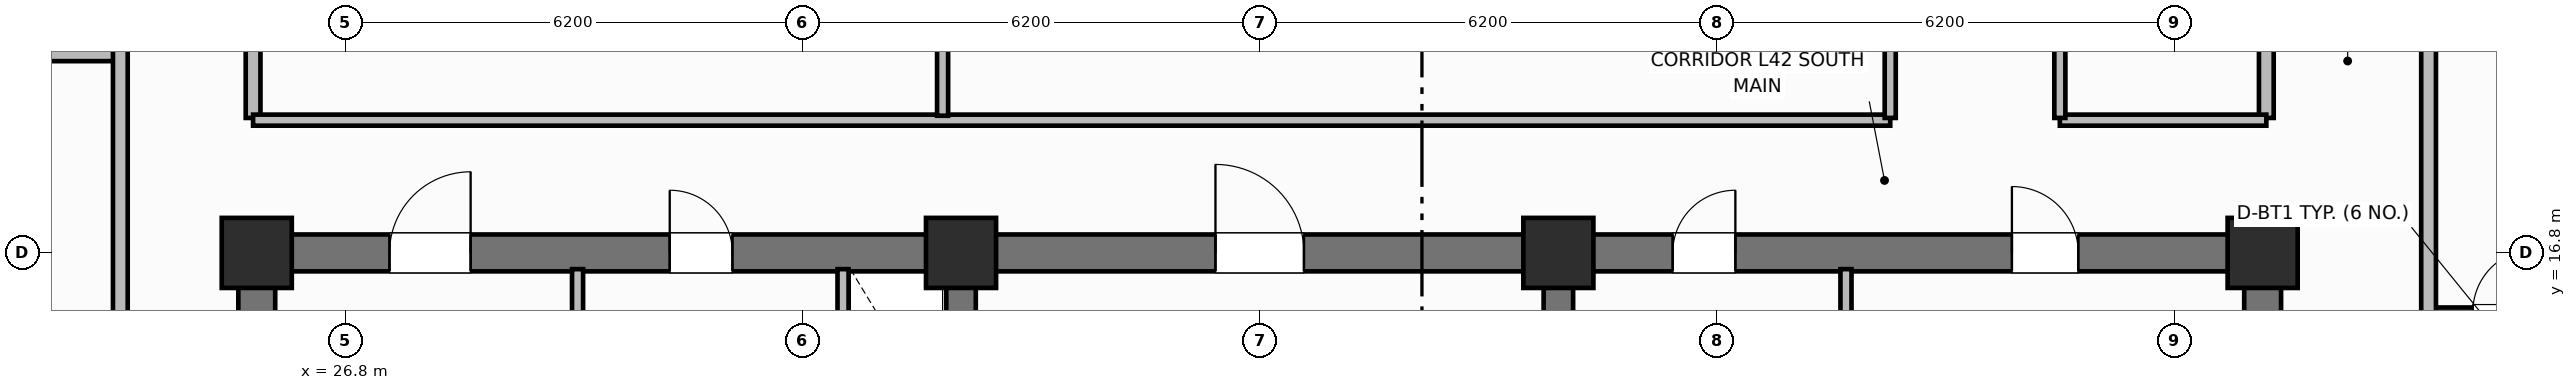
"""IFC4 building model, lengths in metres.
Left out: names, types, materials, properties, quantities, classifications, styles, units other than length and angle.
Written with IfcOpenShell. Run it as: python <this file> out.ifc"""

import sys

from ifc_helpers import new_model, si_unit, direction, frame, frame_2d, origin, origin_2d, place, context, subcontext, project, spatial, rectangle, extrude, element, fill, save


model = new_model("IFC4")
c1 = context("Model", 3, precision=1e-05, world=origin(), true_north=direction((0.0, 1.0)))
c2 = subcontext(c1, "Body", "Model", "MODEL_VIEW")
j1 = project(units=[si_unit("LENGTHUNIT", "METRE"), si_unit("PLANEANGLEUNIT", "RADIAN")], contexts=[c1])
p1 = place(None, origin())
s1 = spatial("IfcSite", under=j1, at=p1, CompositionType="ELEMENT")
p2 = place(p1, origin())
s2 = spatial("IfcBuilding", under=s1, at=p2, CompositionType="ELEMENT")
p3 = place(p2, frame((0.0, 0.0, 170.0)))
s3 = spatial("IfcBuildingStorey", under=s2, at=p3, CompositionType="ELEMENT", Elevation=170.0)
for number, where, z_axis, x_axis in (
    (1, (25.6, 10.85, 0.0), (0.0, 0.0, 1.0), (0.0, 1.0, 0.0)),
    (2, (52.8, 10.85, 0.0), (0.0, 0.0, 1.0), (0.0, 1.0, 0.0)),
):
    element("IfcWall", number, at=place(p3, frame(where, z_axis=z_axis, x_axis=x_axis)), inside=s3, PredefinedType="SHEAR", context=c2, shape_type="SweptSolid", body=[
        extrude(rectangle(XDim=5.7, YDim=0.5, at=frame_2d((2.85, 0.0))), origin(), (0.0, 0.0, 1.0), 3.7),
    ])
p4 = place(p3, frame((25.6, 16.8, 0.0), z_axis=(0.0, 0.0, 1.0), x_axis=(1.0, 0.0, 0.0)))
e3 = element("IfcWall", 3, at=p4, inside=s3, PredefinedType="SHEAR", context=c2, shape_type="SweptSolid", body=[
    extrude(rectangle(XDim=27.2, YDim=0.5, at=frame_2d((13.6, 0.0))), origin(), (0.0, 0.0, 1.0), 3.7),
])
p5 = place(p4, frame((1.8, 0.0, 0.0)))
e4 = element("IfcOpeningElement", 4, at=p5, cuts=e3, PredefinedType="OPENING", context=c2, shape_type="SweptSolid", body=[
    extrude(rectangle(XDim=1.1, YDim=2.15, at=frame_2d((0.55, 1.075))), frame((0.0, 0.26, 0.0), z_axis=(0.0, -1.0, 0.0), x_axis=(1.0, 0.0, 0.0)), (0.0, 0.0, 1.0), 0.52),
])
p6 = place(p4, frame((5.6, 0.0, 0.0)))
e5 = element("IfcOpeningElement", 5, at=p6, cuts=e3, PredefinedType="OPENING", context=c2, shape_type="SweptSolid", body=[
    extrude(rectangle(XDim=0.85, YDim=2.1, at=frame_2d((0.425, 1.05))), frame((0.0, 0.26, 0.0), z_axis=(0.0, -1.0, 0.0), x_axis=(1.0, 0.0, 0.0)), (0.0, 0.0, 1.0), 0.52),
])
p7 = place(p4, frame((13.0, 0.0, 0.0)))
e6 = element("IfcOpeningElement", 6, at=p7, cuts=e3, PredefinedType="OPENING", context=c2, shape_type="SweptSolid", body=[
    extrude(rectangle(XDim=1.2, YDim=2.15, at=frame_2d((0.6, 1.075))), frame((0.0, 0.26, 0.0), z_axis=(0.0, -1.0, 0.0), x_axis=(1.0, 0.0, 0.0)), (0.0, 0.0, 1.0), 0.52),
])
p8 = place(p4, frame((19.2, 0.0, 0.0)))
e7 = element("IfcOpeningElement", 7, at=p8, cuts=e3, PredefinedType="OPENING", context=c2, shape_type="SweptSolid", body=[
    extrude(rectangle(XDim=0.85, YDim=2.1, at=frame_2d((0.425, 1.05))), frame((0.0, 0.26, 0.0), z_axis=(0.0, -1.0, 0.0), x_axis=(1.0, 0.0, 0.0)), (0.0, 0.0, 1.0), 0.52),
])
p9 = place(p4, frame((23.8, 0.0, 0.0)))
e8 = element("IfcOpeningElement", 8, at=p9, cuts=e3, PredefinedType="OPENING", context=c2, shape_type="SweptSolid", body=[
    extrude(rectangle(XDim=0.9, YDim=2.1, at=frame_2d((0.45, 1.05))), frame((0.0, 0.26, 0.0), z_axis=(0.0, -1.0, 0.0), x_axis=(1.0, 0.0, 0.0)), (0.0, 0.0, 1.0), 0.52),
])
for number, where, z_axis, x_axis in (
    (9, (35.15, 10.85, 0.0), (0.0, 0.0, 1.0), (0.0, 1.0, 0.0)),
    (10, (43.25, 10.85, 0.0), (0.0, 0.0, 1.0), (0.0, 1.0, 0.0)),
):
    element("IfcWall", number, at=place(p3, frame(where, z_axis=z_axis, x_axis=x_axis)), inside=s3, PredefinedType="SHEAR", context=c2, shape_type="SweptSolid", body=[
        extrude(rectangle(XDim=5.7, YDim=0.4, at=frame_2d((2.85, 0.0))), origin(), (0.0, 0.0, 1.0), 3.7),
    ])
for number, where, z_axis, x_axis in (
    (11, (25.6, 16.8, 0.0), (0.0, 0.0, 1.0), (1.0, 0.0, 0.0)),
    (12, (35.15, 16.8, 0.0), (0.0, 0.0, 1.0), (1.0, 0.0, 0.0)),
    (13, (43.25, 16.8, 0.0), (0.0, 0.0, 1.0), (1.0, 0.0, 0.0)),
    (14, (52.8, 16.8, 0.0), (0.0, 0.0, 1.0), (1.0, 0.0, 0.0)),
):
    element("IfcColumn", number, at=place(p3, frame(where, z_axis=z_axis, x_axis=x_axis)), inside=s3, PredefinedType="COLUMN", context=c2, shape_type="SweptSolid", body=[
        extrude(rectangle(XDim=0.95, YDim=0.95, at=origin_2d()), origin(), (0.0, 0.0, 1.0), 3.7),
    ])
p10 = place(p3, frame((29.95, 14.5, 0.0), z_axis=(0.0, 0.0, 1.0), x_axis=(0.0, 1.0, 0.0)))
e15 = element("IfcWall", 15, at=p10, inside=s3, PredefinedType="PARTITIONING", context=c2, shape_type="SweptSolid", body=[
    extrude(rectangle(XDim=2.08, YDim=0.15, at=frame_2d((1.04, 0.0))), origin(), (0.0, 0.0, 1.0), 2.55),
])
p11 = place(p3, frame((33.55, 14.5, 0.0), z_axis=(0.0, 0.0, 1.0), x_axis=(0.0, 1.0, 0.0)))
e16 = element("IfcWall", 16, at=p11, inside=s3, PredefinedType="PARTITIONING", context=c2, shape_type="SweptSolid", body=[
    extrude(rectangle(XDim=2.08, YDim=0.15, at=frame_2d((1.04, 0.0))), origin(), (0.0, 0.0, 1.0), 2.55),
])
p12 = place(p11, frame((0.55, 0.0, 0.0)))
e17 = element("IfcOpeningElement", 17, at=p12, cuts=e16, PredefinedType="OPENING", context=c2, shape_type="SweptSolid", body=[
    extrude(rectangle(XDim=0.85, YDim=2.05, at=frame_2d((0.425, 1.025))), frame((0.0, 0.085, 0.0), z_axis=(0.0, -1.0, 0.0), x_axis=(1.0, 0.0, 0.0)), (0.0, 0.0, 1.0), 0.17),
])
p13 = place(p3, frame((47.15, 10.95, 0.0), z_axis=(0.0, 0.0, 1.0), x_axis=(0.0, 1.0, 0.0)))
e18 = element("IfcWall", 18, at=p13, inside=s3, PredefinedType="PARTITIONING", context=c2, shape_type="SweptSolid", body=[
    extrude(rectangle(XDim=5.63, YDim=0.15, at=frame_2d((2.815, 0.0))), origin(), (0.0, 0.0, 1.0), 2.55),
])
for number, where, z_axis, x_axis in (
    (19, (25.55, 18.63, 0.0), (0.0, 0.0, 1.0), (0.0, 1.0, 0.0)),
    (20, (52.85, 18.63, 0.0), (0.0, 0.0, 1.0), (0.0, 1.0, 0.0)),
):
    element("IfcWall", number, at=place(p3, frame(where, z_axis=z_axis, x_axis=x_axis)), inside=s3, PredefinedType="PARTITIONING", context=c2, shape_type="SweptSolid", body=[
        extrude(rectangle(XDim=19.14, YDim=0.2, at=frame_2d((9.57, 0.0))), origin(), (0.0, 0.0, 1.0), 2.55),
    ])
p14 = place(p3, frame((25.55, 18.6, 0.0), z_axis=(0.0, 0.0, 1.0), x_axis=(1.0, 0.0, 0.0)))
e21 = element("IfcWall", 21, at=p14, inside=s3, PredefinedType="PARTITIONING", context=c2, shape_type="SweptSolid", body=[
    extrude(rectangle(XDim=22.2, YDim=0.15, at=frame_2d((11.1, 0.0))), origin(), (0.0, 0.0, 1.0), 2.55),
])
p15 = place(p3, frame((50.05, 18.6, 0.0), z_axis=(0.0, 0.0, 1.0), x_axis=(1.0, 0.0, 0.0)))
e22 = element("IfcWall", 22, at=p15, inside=s3, PredefinedType="PARTITIONING", context=c2, shape_type="SweptSolid", body=[
    extrude(rectangle(XDim=2.8, YDim=0.15, at=frame_2d((1.4, 0.0))), origin(), (0.0, 0.0, 1.0), 2.55),
])
p16 = place(p3, frame((34.9, 18.66, 0.0), z_axis=(0.0, 0.0, 1.0), x_axis=(0.0, 1.0, 0.0)))
e23 = element("IfcWall", 23, at=p16, inside=s3, PredefinedType="PARTITIONING", context=c2, shape_type="SweptSolid", body=[
    extrude(rectangle(XDim=19.08, YDim=0.15, at=frame_2d((9.54, 0.0))), origin(), (0.0, 0.0, 1.0), 2.55),
])
p17 = place(p16, frame((5.0, 0.0, 0.0)))
e24 = element("IfcOpeningElement", 24, at=p17, cuts=e23, PredefinedType="OPENING", context=c2, shape_type="SweptSolid", body=[
    extrude(rectangle(XDim=1.0, YDim=2.15, at=frame_2d((0.5, 1.075))), frame((0.0, 0.085, 0.0), z_axis=(0.0, -1.0, 0.0), x_axis=(1.0, 0.0, 0.0)), (0.0, 0.0, 1.0), 0.17),
])
p18 = place(p3, frame((47.75, 18.63, 0.0), z_axis=(0.0, 0.0, 1.0), x_axis=(0.0, 1.0, 0.0)))
e25 = element("IfcWall", 25, at=p18, inside=s3, PredefinedType="PARTITIONING", context=c2, shape_type="SweptSolid", body=[
    extrude(rectangle(XDim=19.14, YDim=0.15, at=frame_2d((9.57, 0.0))), origin(), (0.0, 0.0, 1.0), 2.55),
])
p19 = place(p18, frame((2.4, 0.0, 0.0)))
e26 = element("IfcOpeningElement", 26, at=p19, cuts=e25, PredefinedType="OPENING", context=c2, shape_type="SweptSolid", body=[
    extrude(rectangle(XDim=0.9, YDim=2.1, at=frame_2d((0.45, 1.05))), frame((0.0, 0.085, 0.0), z_axis=(0.0, -1.0, 0.0), x_axis=(1.0, 0.0, 0.0)), (0.0, 0.0, 1.0), 0.17),
])
p20 = place(p18, frame((10.804, 0.0, 0.0)))
e27 = element("IfcOpeningElement", 27, at=p20, cuts=e25, PredefinedType="OPENING", context=c2, shape_type="SweptSolid", body=[
    extrude(rectangle(XDim=0.9, YDim=2.1, at=frame_2d((0.45, 1.05))), frame((0.0, 0.085, 0.0), z_axis=(0.0, -1.0, 0.0), x_axis=(1.0, 0.0, 0.0)), (0.0, 0.0, 1.0), 0.17),
])
p21 = place(p3, frame((50.05, 18.63, 0.0), z_axis=(0.0, 0.0, 1.0), x_axis=(0.0, 1.0, 0.0)))
e28 = element("IfcWall", 28, at=p21, inside=s3, PredefinedType="PARTITIONING", context=c2, shape_type="SweptSolid", body=[
    extrude(rectangle(XDim=19.14, YDim=0.15, at=frame_2d((9.57, 0.0))), origin(), (0.0, 0.0, 1.0), 2.55),
])
p22 = place(p21, frame((2.4, 0.0, 0.0)))
e29 = element("IfcOpeningElement", 29, at=p22, cuts=e28, PredefinedType="OPENING", context=c2, shape_type="SweptSolid", body=[
    extrude(rectangle(XDim=1.0, YDim=2.15, at=frame_2d((0.5, 1.075))), frame((0.0, 0.085, 0.0), z_axis=(0.0, -1.0, 0.0), x_axis=(1.0, 0.0, 0.0)), (0.0, 0.0, 1.0), 0.17),
])
p23 = place(p21, frame((10.804, 0.0, 0.0)))
e30 = element("IfcOpeningElement", 30, at=p23, cuts=e28, PredefinedType="OPENING", context=c2, shape_type="SweptSolid", body=[
    extrude(rectangle(XDim=1.0, YDim=2.15, at=frame_2d((0.5, 1.075))), frame((0.0, 0.085, 0.0), z_axis=(0.0, -1.0, 0.0), x_axis=(1.0, 0.0, 0.0)), (0.0, 0.0, 1.0), 0.17),
])
p24 = place(p3, frame((16.57, 19.5, 0.0), z_axis=(0.0, 0.0, 1.0), x_axis=(1.0, 0.0, 0.0)))
e31 = element("IfcWall", 31, at=p24, inside=s3, PredefinedType="PARTITIONING", context=c2, shape_type="SweptSolid", body=[
    extrude(rectangle(XDim=7.18, YDim=0.2, at=frame_2d((3.59, 0.0))), origin(), (0.0, 0.0, 1.0), 2.55),
])
p25 = place(p3, frame((23.75, 10.6, 0.0), z_axis=(0.0, 0.0, 1.0), x_axis=(0.0, 1.0, 0.0)))
e32 = element("IfcWall", 32, at=p25, inside=s3, PredefinedType="PARTITIONING", context=c2, shape_type="SweptSolid", body=[
    extrude(rectangle(XDim=35.2, YDim=0.2, at=frame_2d((17.6, 0.0))), origin(), (0.0, 0.0, 1.0), 2.55),
])
p26 = place(p25, frame((2.65, 0.0, 0.0)))
e33 = element("IfcOpeningElement", 33, at=p26, cuts=e32, PredefinedType="OPENING", context=c2, shape_type="SweptSolid", body=[
    extrude(rectangle(XDim=1.0, YDim=2.15, at=frame_2d((0.5, 1.075))), frame((0.0, 0.11, 0.0), z_axis=(0.0, -1.0, 0.0), x_axis=(1.0, 0.0, 0.0)), (0.0, 0.0, 1.0), 0.22),
])
p27 = place(p25, frame((11.4, 0.0, 0.0)))
e34 = element("IfcOpeningElement", 34, at=p27, cuts=e32, PredefinedType="OPENING", context=c2, shape_type="SweptSolid", body=[
    extrude(rectangle(XDim=1.0, YDim=2.15, at=frame_2d((0.5, 1.075))), frame((0.0, 0.11, 0.0), z_axis=(0.0, -1.0, 0.0), x_axis=(1.0, 0.0, 0.0)), (0.0, 0.0, 1.0), 0.22),
])
p28 = place(p25, frame((21.37, 0.0, 0.0)))
e35 = element("IfcOpeningElement", 35, at=p28, cuts=e32, PredefinedType="OPENING", context=c2, shape_type="SweptSolid", body=[
    extrude(rectangle(XDim=1.0, YDim=2.15, at=frame_2d((0.5, 1.075))), frame((0.0, 0.11, 0.0), z_axis=(0.0, -1.0, 0.0), x_axis=(1.0, 0.0, 0.0)), (0.0, 0.0, 1.0), 0.22),
])
p29 = place(p25, frame((27.302, 0.0, 0.0)))
e36 = element("IfcOpeningElement", 36, at=p29, cuts=e32, PredefinedType="OPENING", context=c2, shape_type="SweptSolid", body=[
    extrude(rectangle(XDim=1.0, YDim=2.15, at=frame_2d((0.5, 1.075))), frame((0.0, 0.11, 0.0), z_axis=(0.0, -1.0, 0.0), x_axis=(1.0, 0.0, 0.0)), (0.0, 0.0, 1.0), 0.22),
])
p30 = place(p3, frame((55.05, 16.0, 0.0), z_axis=(0.0, 0.0, 1.0), x_axis=(1.0, 0.0, 0.0)))
e37 = element("IfcWall", 37, at=p30, inside=s3, PredefinedType="PARTITIONING", context=c2, shape_type="SweptSolid", body=[
    extrude(rectangle(XDim=2.25, YDim=0.12, at=frame_2d((1.125, 0.0))), origin(), (0.0, 0.0, 1.0), 2.55),
])
p31 = place(p30, frame((0.6, 0.0, 0.0)))
e38 = element("IfcOpeningElement", 38, at=p31, cuts=e37, PredefinedType="OPENING", context=c2, shape_type="SweptSolid", body=[
    extrude(rectangle(XDim=0.85, YDim=2.1, at=frame_2d((0.425, 1.05))), frame((0.0, 0.07, 0.0), z_axis=(0.0, -1.0, 0.0), x_axis=(1.0, 0.0, 0.0)), (0.0, 0.0, 1.0), 0.14),
])
p32 = place(p3, frame((55.05, 10.6, 0.0), z_axis=(0.0, 0.0, 1.0), x_axis=(0.0, 1.0, 0.0)))
e39 = element("IfcWall", 39, at=p32, inside=s3, PredefinedType="PARTITIONING", context=c2, shape_type="SweptSolid", body=[
    extrude(rectangle(XDim=35.2, YDim=0.2, at=frame_2d((17.6, 0.0))), origin(), (0.0, 0.0, 1.0), 2.55),
])
p33 = place(p32, frame((2.65, 0.0, 0.0)))
e40 = element("IfcOpeningElement", 40, at=p33, cuts=e39, PredefinedType="OPENING", context=c2, shape_type="SweptSolid", body=[
    extrude(rectangle(XDim=1.0, YDim=2.15, at=frame_2d((0.5, 1.075))), frame((0.0, 0.11, 0.0), z_axis=(0.0, -1.0, 0.0), x_axis=(1.0, 0.0, 0.0)), (0.0, 0.0, 1.0), 0.22),
])
p34 = place(p32, frame((19.95, 0.0, 0.0)))
e41 = element("IfcOpeningElement", 41, at=p34, cuts=e39, PredefinedType="OPENING", context=c2, shape_type="SweptSolid", body=[
    extrude(rectangle(XDim=1.0, YDim=2.15, at=frame_2d((0.5, 1.075))), frame((0.0, 0.11, 0.0), z_axis=(0.0, -1.0, 0.0), x_axis=(1.0, 0.0, 0.0)), (0.0, 0.0, 1.0), 0.22),
])
p35 = place(p31, origin())
e42 = element("IfcDoor", 42, at=p35, inside=s3, OperationType="SINGLE_SWING_RIGHT", PredefinedType="DOOR", context=c2, shape_type="SweptSolid", body=[
    extrude(rectangle(XDim=0.85, YDim=2.1, at=frame_2d((0.425, 1.05))), frame((0.0, 0.025, 0.0), z_axis=(0.0, -1.0, 0.0), x_axis=(1.0, 0.0, 0.0)), (0.0, 0.0, 1.0), 0.05),
])
fill(e38, e42)
p36 = place(p5, origin())
e43 = element("IfcDoor", 43, at=p36, inside=s3, OperationType="SINGLE_SWING_RIGHT", PredefinedType="DOOR", context=c2, shape_type="SweptSolid", body=[
    extrude(rectangle(XDim=1.1, YDim=2.15, at=frame_2d((0.55, 1.075))), frame((0.0, 0.025, 0.0), z_axis=(0.0, -1.0, 0.0), x_axis=(1.0, 0.0, 0.0)), (0.0, 0.0, 1.0), 0.05),
])
fill(e4, e43)
p37 = place(p6, origin())
e44 = element("IfcDoor", 44, at=p37, inside=s3, OperationType="SINGLE_SWING_LEFT", PredefinedType="DOOR", context=c2, shape_type="SweptSolid", body=[
    extrude(rectangle(XDim=0.85, YDim=2.1, at=frame_2d((0.425, 1.05))), frame((0.0, 0.025, 0.0), z_axis=(0.0, -1.0, 0.0), x_axis=(1.0, 0.0, 0.0)), (0.0, 0.0, 1.0), 0.05),
])
fill(e5, e44)
p38 = place(p7, origin())
e45 = element("IfcDoor", 45, at=p38, inside=s3, OperationType="SINGLE_SWING_LEFT", PredefinedType="DOOR", context=c2, shape_type="SweptSolid", body=[
    extrude(rectangle(XDim=1.2, YDim=2.15, at=frame_2d((0.6, 1.075))), frame((0.0, 0.025, 0.0), z_axis=(0.0, -1.0, 0.0), x_axis=(1.0, 0.0, 0.0)), (0.0, 0.0, 1.0), 0.05),
])
fill(e6, e45)
p39 = place(p8, origin())
e46 = element("IfcDoor", 46, at=p39, inside=s3, OperationType="SINGLE_SWING_RIGHT", PredefinedType="DOOR", context=c2, shape_type="SweptSolid", body=[
    extrude(rectangle(XDim=0.85, YDim=2.1, at=frame_2d((0.425, 1.05))), frame((0.0, 0.025, 0.0), z_axis=(0.0, -1.0, 0.0), x_axis=(1.0, 0.0, 0.0)), (0.0, 0.0, 1.0), 0.05),
])
fill(e7, e46)
p40 = place(p9, origin())
e47 = element("IfcDoor", 47, at=p40, inside=s3, OperationType="SINGLE_SWING_LEFT", PredefinedType="DOOR", context=c2, shape_type="SweptSolid", body=[
    extrude(rectangle(XDim=0.9, YDim=2.1, at=frame_2d((0.45, 1.05))), frame((0.0, 0.025, 0.0), z_axis=(0.0, -1.0, 0.0), x_axis=(1.0, 0.0, 0.0)), (0.0, 0.0, 1.0), 0.05),
])
fill(e8, e47)
save(model, sys.argv[1])
